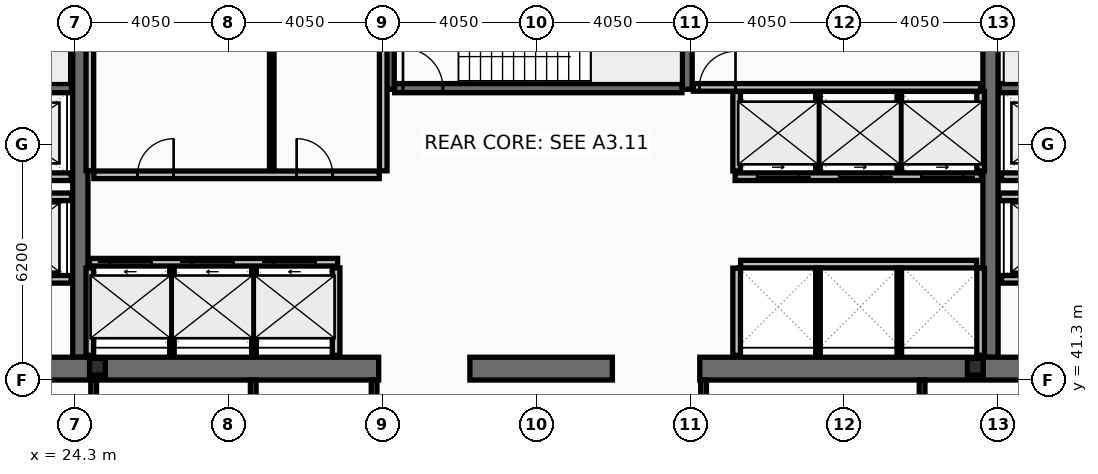
"""IFC4 building model, lengths in metres.
Left out: names, types, materials, properties, quantities, classifications, styles, units other than length and angle.
Written with IfcOpenShell. Run it as: python <this file> out.ifc"""

import sys

from ifc_helpers import new_model, si_unit, direction, frame, frame_2d, origin, origin_2d, place, context, subcontext, project, spatial, rectangle, i_section, extrude, element, fill, save


model = new_model("IFC4")
c1 = context("Model", 3, precision=1e-05, world=origin(), true_north=direction((0.0, 1.0)))
c2 = subcontext(c1, "Body", "Model", "MODEL_VIEW")
j1 = project(units=[si_unit("LENGTHUNIT", "METRE"), si_unit("PLANEANGLEUNIT", "RADIAN")], contexts=[c1])
p1 = place(None, origin())
s1 = spatial("IfcSite", under=j1, at=p1, CompositionType="ELEMENT")
p2 = place(p1, origin())
s2 = spatial("IfcBuilding", under=s1, at=p2, CompositionType="ELEMENT")
p3 = place(p2, frame((0.0, 0.0, 184.2)))
s3 = spatial("IfcBuildingStorey", under=s2, at=p3, CompositionType="ELEMENT", Elevation=184.2)
for number, where, z_axis, x_axis in (
    (1, (24.45, 41.9, 0.0), (0.0, 0.0, 1.0), (0.0, 1.0, 0.0)),
    (2, (48.4, 41.9, 0.0), (0.0, 0.0, 1.0), (0.0, 1.0, 0.0)),
):
    element("IfcWall", number, at=place(p3, frame(where, z_axis=z_axis, x_axis=x_axis)), inside=s3, PredefinedType="SHEAR", context=c2, shape_type="SweptSolid", body=[
        extrude(rectangle(XDim=11.2, YDim=0.4, at=frame_2d((5.6, 0.0))), origin(), (0.0, 0.0, 1.0), 4.24),
    ])
p4 = place(p3, frame((32.3, 41.6, 0.0), z_axis=(0.0, 0.0, 1.0), x_axis=(-1.0, 0.0, 0.0)))
e3 = element("IfcWall", 3, at=p4, inside=s3, PredefinedType="SHEAR", context=c2, shape_type="SweptSolid", body=[
    extrude(rectangle(XDim=11.45, YDim=0.6, at=frame_2d((5.725, 0.0))), origin(), (0.0, 0.0, 1.0), 4.24),
])
p5 = place(p3, frame((38.45, 41.6, 0.0), z_axis=(0.0, 0.0, 1.0), x_axis=(-1.0, 0.0, 0.0)))
e4 = element("IfcWall", 4, at=p5, inside=s3, PredefinedType="SHEAR", context=c2, shape_type="SweptSolid", body=[
    extrude(rectangle(XDim=3.75, YDim=0.6, at=frame_2d((1.875, 0.0))), origin(), (0.0, 0.0, 1.0), 4.24),
])
p6 = place(p3, frame((52.05, 41.6, 0.0), z_axis=(0.0, 0.0, 1.0), x_axis=(-1.0, 0.0, 0.0)))
e5 = element("IfcWall", 5, at=p6, inside=s3, PredefinedType="SHEAR", context=c2, shape_type="SweptSolid", body=[
    extrude(rectangle(XDim=11.3, YDim=0.6, at=frame_2d((5.65, 0.0))), origin(), (0.0, 0.0, 1.0), 4.24),
])
for number, where, z_axis, x_axis in (
    (6, (32.58, 48.95, 0.0), (0.0, 0.0, 1.0), (0.0, 1.0, 0.0)),
    (7, (40.42, 48.95, 0.0), (0.0, 0.0, 1.0), (0.0, 1.0, 0.0)),
):
    element("IfcWall", number, at=place(p3, frame(where, z_axis=z_axis, x_axis=x_axis)), inside=s3, PredefinedType="SHEAR", context=c2, shape_type="SweptSolid", body=[
        extrude(rectangle(XDim=4.15, YDim=0.26, at=frame_2d((2.075, 0.0))), origin(), (0.0, 0.0, 1.0), 4.24),
    ])
p7 = place(p3, frame((16.8, 48.98, 0.0), z_axis=(0.0, 0.0, 1.0), x_axis=(1.0, 0.0, 0.0)))
e8 = element("IfcWall", 8, at=p7, inside=s3, PredefinedType="SHEAR", context=c2, shape_type="SweptSolid", body=[
    extrude(rectangle(XDim=7.42, YDim=0.24, at=frame_2d((3.71, 0.0))), origin(), (0.0, 0.0, 1.0), 4.24),
])
p8 = place(p7, frame((0.22, 0.0, 0.0)))
e9 = element("IfcOpeningElement", 9, at=p8, cuts=e8, PredefinedType="OPENING", context=c2, shape_type="SweptSolid", body=[
    extrude(rectangle(XDim=1.05, YDim=2.15, at=frame_2d((0.525, 1.075))), frame((0.0, 0.13, 0.0), z_axis=(0.0, -1.0, 0.0), x_axis=(1.0, 0.0, 0.0)), (0.0, 0.0, 1.0), 0.26),
])
p9 = place(p3, frame((48.63, 48.98, 0.0), z_axis=(0.0, 0.0, 1.0), x_axis=(1.0, 0.0, 0.0)))
e10 = element("IfcWall", 10, at=p9, inside=s3, PredefinedType="SHEAR", context=c2, shape_type="SweptSolid", body=[
    extrude(rectangle(XDim=7.47, YDim=0.24, at=frame_2d((3.735, 0.0))), origin(), (0.0, 0.0, 1.0), 4.24),
])
p10 = place(p9, frame((6.2, 0.0, 0.0)))
e11 = element("IfcOpeningElement", 11, at=p10, cuts=e10, PredefinedType="OPENING", context=c2, shape_type="SweptSolid", body=[
    extrude(rectangle(XDim=1.05, YDim=2.15, at=frame_2d((0.525, 1.075))), frame((0.0, 0.13, 0.0), z_axis=(0.0, -1.0, 0.0), x_axis=(1.0, 0.0, 0.0)), (0.0, 0.0, 1.0), 0.26),
])
p11 = place(p3, frame((32.72, 48.98, 0.0), z_axis=(0.0, 0.0, 1.0), x_axis=(1.0, 0.0, 0.0)))
e12 = element("IfcWall", 12, at=p11, inside=s3, PredefinedType="SHEAR", context=c2, shape_type="SweptSolid", body=[
    extrude(rectangle(XDim=7.56, YDim=0.24, at=frame_2d((3.78, 0.0))), origin(), (0.0, 0.0, 1.0), 4.24),
])
p12 = place(p11, frame((0.22, 0.0, 0.0)))
e13 = element("IfcOpeningElement", 13, at=p12, cuts=e12, PredefinedType="OPENING", context=c2, shape_type="SweptSolid", body=[
    extrude(rectangle(XDim=1.05, YDim=2.15, at=frame_2d((0.525, 1.075))), frame((0.0, 0.13, 0.0), z_axis=(0.0, -1.0, 0.0), x_axis=(1.0, 0.0, 0.0)), (0.0, 0.0, 1.0), 0.26),
])
for number, where, z_axis, x_axis in (
    (14, (24.9, 41.65, 0.0), (0.0, 0.0, 1.0), (1.0, 0.0, 0.0)),
    (15, (48.0, 41.65, 0.0), (0.0, 0.0, 1.0), (1.0, 0.0, 0.0)),
):
    element("IfcColumn", number, at=place(p3, frame(where, z_axis=z_axis, x_axis=x_axis)), inside=s3, PredefinedType="COLUMN", context=c2, shape_type="SweptSolid", body=[
        extrude(i_section(OverallWidth=0.416, OverallDepth=0.446, WebThickness=0.039, FlangeThickness=0.063, at=origin_2d()), origin(), (0.0, 0.0, 1.0), 4.4),
    ])
p13 = place(p3, frame((24.69, 44.4, 0.0), z_axis=(0.0, 0.0, 1.0), x_axis=(1.0, 0.0, 0.0)))
e16 = element("IfcWall", 16, at=p13, inside=s3, PredefinedType="PARTITIONING", context=c2, shape_type="SweptSolid", body=[
    extrude(rectangle(XDim=6.53, YDim=0.2, at=frame_2d((3.265, 0.0))), origin(), (0.0, 0.0, 1.0), 4.24),
])
p14 = place(p13, frame((0.53, 0.0, 0.0)))
e17 = element("IfcOpeningElement", 17, at=p14, cuts=e16, PredefinedType="OPENING", context=c2, shape_type="SweptSolid", body=[
    extrude(rectangle(XDim=1.1, YDim=2.18, at=frame_2d((0.55, 1.09))), frame((0.0, 0.11, 0.0), z_axis=(0.0, -1.0, 0.0), x_axis=(1.0, 0.0, 0.0)), (0.0, 0.0, 1.0), 0.22),
])
p15 = place(p13, frame((2.69, 0.0, 0.0)))
e18 = element("IfcOpeningElement", 18, at=p15, cuts=e16, PredefinedType="OPENING", context=c2, shape_type="SweptSolid", body=[
    extrude(rectangle(XDim=1.1, YDim=2.18, at=frame_2d((0.55, 1.09))), frame((0.0, 0.11, 0.0), z_axis=(0.0, -1.0, 0.0), x_axis=(1.0, 0.0, 0.0)), (0.0, 0.0, 1.0), 0.22),
])
p16 = place(p13, frame((4.85, 0.0, 0.0)))
e19 = element("IfcOpeningElement", 19, at=p16, cuts=e16, PredefinedType="OPENING", context=c2, shape_type="SweptSolid", body=[
    extrude(rectangle(XDim=1.1, YDim=2.18, at=frame_2d((0.55, 1.09))), frame((0.0, 0.11, 0.0), z_axis=(0.0, -1.0, 0.0), x_axis=(1.0, 0.0, 0.0)), (0.0, 0.0, 1.0), 0.22),
])
p17 = place(p3, frame((51.61, 43.95, 0.0), z_axis=(0.0, 0.0, 1.0), x_axis=(-1.0, 0.0, 0.0)))
e20 = element("IfcWall", 20, at=p17, inside=s3, PredefinedType="PARTITIONING", context=c2, shape_type="SweptSolid", body=[
    extrude(rectangle(XDim=2.92, YDim=0.2, at=frame_2d((1.46, 0.0))), origin(), (0.0, 0.0, 1.0), 4.24),
])
p18 = place(p17, frame((0.81, 0.0, 0.0)))
e21 = element("IfcOpeningElement", 21, at=p18, cuts=e20, PredefinedType="OPENING", context=c2, shape_type="SweptSolid", body=[
    extrude(rectangle(XDim=1.3, YDim=2.18, at=frame_2d((0.65, 1.09))), frame((0.0, 0.11, 0.0), z_axis=(0.0, -1.0, 0.0), x_axis=(1.0, 0.0, 0.0)), (0.0, 0.0, 1.0), 0.22),
])
p19 = place(p3, frame((24.21, 43.95, 0.0), z_axis=(0.0, 0.0, 1.0), x_axis=(-1.0, 0.0, 0.0)))
e22 = element("IfcWall", 22, at=p19, inside=s3, PredefinedType="PARTITIONING", context=c2, shape_type="SweptSolid", body=[
    extrude(rectangle(XDim=2.97, YDim=0.2, at=frame_2d((1.485, 0.0))), origin(), (0.0, 0.0, 1.0), 4.24),
])
p20 = place(p19, frame((0.86, 0.0, 0.0)))
e23 = element("IfcOpeningElement", 23, at=p20, cuts=e22, PredefinedType="OPENING", context=c2, shape_type="SweptSolid", body=[
    extrude(rectangle(XDim=1.3, YDim=2.18, at=frame_2d((0.65, 1.09))), frame((0.0, 0.11, 0.0), z_axis=(0.0, -1.0, 0.0), x_axis=(1.0, 0.0, 0.0)), (0.0, 0.0, 1.0), 0.22),
])
p21 = place(p3, frame((51.61, 46.65, 0.0), z_axis=(0.0, 0.0, 1.0), x_axis=(-1.0, 0.0, 0.0)))
e24 = element("IfcWall", 24, at=p21, inside=s3, PredefinedType="PARTITIONING", context=c2, shape_type="SweptSolid", body=[
    extrude(rectangle(XDim=2.92, YDim=0.2, at=frame_2d((1.46, 0.0))), origin(), (0.0, 0.0, 1.0), 4.24),
])
p22 = place(p21, frame((0.86, 0.0, 0.0)))
e25 = element("IfcOpeningElement", 25, at=p22, cuts=e24, PredefinedType="OPENING", context=c2, shape_type="SweptSolid", body=[
    extrude(rectangle(XDim=1.2, YDim=2.18, at=frame_2d((0.6, 1.09))), frame((0.0, 0.11, 0.0), z_axis=(0.0, -1.0, 0.0), x_axis=(1.0, 0.0, 0.0)), (0.0, 0.0, 1.0), 0.22),
])
p23 = place(p3, frame((24.21, 46.65, 0.0), z_axis=(0.0, 0.0, 1.0), x_axis=(-1.0, 0.0, 0.0)))
e26 = element("IfcWall", 26, at=p23, inside=s3, PredefinedType="PARTITIONING", context=c2, shape_type="SweptSolid", body=[
    extrude(rectangle(XDim=2.97, YDim=0.2, at=frame_2d((1.485, 0.0))), origin(), (0.0, 0.0, 1.0), 4.24),
])
p24 = place(p23, frame((0.91, 0.0, 0.0)))
e27 = element("IfcOpeningElement", 27, at=p24, cuts=e26, PredefinedType="OPENING", context=c2, shape_type="SweptSolid", body=[
    extrude(rectangle(XDim=1.2, YDim=2.18, at=frame_2d((0.6, 1.09))), frame((0.0, 0.11, 0.0), z_axis=(0.0, -1.0, 0.0), x_axis=(1.0, 0.0, 0.0)), (0.0, 0.0, 1.0), 0.22),
])
p25 = place(p3, frame((48.16, 46.65, 0.0), z_axis=(0.0, 0.0, 1.0), x_axis=(-1.0, 0.0, 0.0)))
e28 = element("IfcWall", 28, at=p25, inside=s3, PredefinedType="PARTITIONING", context=c2, shape_type="SweptSolid", body=[
    extrude(rectangle(XDim=6.48, YDim=0.2, at=frame_2d((3.24, 0.0))), origin(), (0.0, 0.0, 1.0), 4.24),
])
p26 = place(p25, frame((4.8, 0.0, 0.0)))
e29 = element("IfcOpeningElement", 29, at=p26, cuts=e28, PredefinedType="OPENING", context=c2, shape_type="SweptSolid", body=[
    extrude(rectangle(XDim=1.1, YDim=2.18, at=frame_2d((0.55, 1.09))), frame((0.0, 0.11, 0.0), z_axis=(0.0, -1.0, 0.0), x_axis=(1.0, 0.0, 0.0)), (0.0, 0.0, 1.0), 0.22),
])
p27 = place(p25, frame((2.64, 0.0, 0.0)))
e30 = element("IfcOpeningElement", 30, at=p27, cuts=e28, PredefinedType="OPENING", context=c2, shape_type="SweptSolid", body=[
    extrude(rectangle(XDim=1.1, YDim=2.18, at=frame_2d((0.55, 1.09))), frame((0.0, 0.11, 0.0), z_axis=(0.0, -1.0, 0.0), x_axis=(1.0, 0.0, 0.0)), (0.0, 0.0, 1.0), 0.22),
])
p28 = place(p25, frame((0.48, 0.0, 0.0)))
e31 = element("IfcOpeningElement", 31, at=p28, cuts=e28, PredefinedType="OPENING", context=c2, shape_type="SweptSolid", body=[
    extrude(rectangle(XDim=1.1, YDim=2.18, at=frame_2d((0.55, 1.09))), frame((0.0, 0.11, 0.0), z_axis=(0.0, -1.0, 0.0), x_axis=(1.0, 0.0, 0.0)), (0.0, 0.0, 1.0), 0.22),
])
p29 = place(p3, frame((21.2, 46.12, 0.0), z_axis=(0.0, 0.0, 1.0), x_axis=(1.0, 0.0, 0.0)))
e32 = element("IfcWall", 32, at=p29, inside=s3, PredefinedType="PARTITIONING", context=c2, shape_type="SweptSolid", body=[
    extrude(rectangle(XDim=3.02, YDim=0.2, at=frame_2d((1.51, 0.0))), origin(), (0.0, 0.0, 1.0), 4.24),
])
p30 = place(p3, frame((48.63, 46.12, 0.0), z_axis=(0.0, 0.0, 1.0), x_axis=(1.0, 0.0, 0.0)))
e33 = element("IfcWall", 33, at=p30, inside=s3, PredefinedType="PARTITIONING", context=c2, shape_type="SweptSolid", body=[
    extrude(rectangle(XDim=3.07, YDim=0.2, at=frame_2d((1.535, 0.0))), origin(), (0.0, 0.0, 1.0), 4.24),
])
for number, where, z_axis, x_axis in (
    (34, (24.7, 46.805, 0.0), (0.0, 0.0, 1.0), (0.0, 1.0, 0.0)),
    (35, (32.42, 46.805, 0.0), (0.0, 0.0, 1.0), (0.0, 1.0, 0.0)),
):
    element("IfcWall", number, at=place(p3, frame(where, z_axis=z_axis, x_axis=x_axis)), inside=s3, PredefinedType="PARTITIONING", context=c2, shape_type="SweptSolid", body=[
        extrude(rectangle(XDim=5.99, YDim=0.2, at=frame_2d((2.995, 0.0))), origin(), (0.0, 0.0, 1.0), 4.24),
    ])
p31 = place(p3, frame((29.486, 46.805, 0.0), z_axis=(0.0, 0.0, 1.0), x_axis=(0.0, 1.0, 0.0)))
e36 = element("IfcWall", 36, at=p31, inside=s3, PredefinedType="PARTITIONING", context=c2, shape_type="SweptSolid", body=[
    extrude(rectangle(XDim=5.99, YDim=0.12, at=frame_2d((2.995, 0.0))), origin(), (0.0, 0.0, 1.0), 4.24),
])
p32 = place(p3, frame((24.805, 46.7, 0.0), z_axis=(0.0, 0.0, 1.0), x_axis=(1.0, 0.0, 0.0)))
e37 = element("IfcWall", 37, at=p32, inside=s3, PredefinedType="PARTITIONING", context=c2, shape_type="SweptSolid", body=[
    extrude(rectangle(XDim=7.51, YDim=0.2, at=frame_2d((3.755, 0.0))), origin(), (0.0, 0.0, 1.0), 4.24),
])
p33 = place(p32, frame((1.15, 0.0, 0.0)))
e38 = element("IfcOpeningElement", 38, at=p33, cuts=e37, PredefinedType="OPENING", context=c2, shape_type="SweptSolid", body=[
    extrude(rectangle(XDim=0.95, YDim=2.1, at=frame_2d((0.475, 1.05))), frame((0.0, 0.11, 0.0), z_axis=(0.0, -1.0, 0.0), x_axis=(1.0, 0.0, 0.0)), (0.0, 0.0, 1.0), 0.22),
])
p34 = place(p32, frame((5.336, 0.0, 0.0)))
e39 = element("IfcOpeningElement", 39, at=p34, cuts=e37, PredefinedType="OPENING", context=c2, shape_type="SweptSolid", body=[
    extrude(rectangle(XDim=0.95, YDim=2.1, at=frame_2d((0.475, 1.05))), frame((0.0, 0.11, 0.0), z_axis=(0.0, -1.0, 0.0), x_axis=(1.0, 0.0, 0.0)), (0.0, 0.0, 1.0), 0.22),
])
for number, where, z_axis, x_axis in (
    (40, (24.7, 41.95, 0.0), (0.0, 0.0, 1.0), (0.0, 1.0, 0.0)),
    (41, (31.18, 41.95, 0.0), (0.0, 0.0, 1.0), (0.0, 1.0, 0.0)),
):
    element("IfcWall", number, at=place(p3, frame(where, z_axis=z_axis, x_axis=x_axis)), inside=s3, PredefinedType="PARTITIONING", context=c2, shape_type="SweptSolid", body=[
        extrude(rectangle(XDim=2.3, YDim=0.2, at=frame_2d((1.15, 0.0))), origin(), (0.0, 0.0, 1.0), 4.24),
    ])
for number, where, z_axis, x_axis in (
    (42, (26.86, 41.95, 0.0), (0.0, 0.0, 1.0), (0.0, 1.0, 0.0)),
    (43, (29.02, 41.95, 0.0), (0.0, 0.0, 1.0), (0.0, 1.0, 0.0)),
):
    element("IfcWall", number, at=place(p3, frame(where, z_axis=z_axis, x_axis=x_axis)), inside=s3, PredefinedType="PARTITIONING", context=c2, shape_type="SweptSolid", body=[
        extrude(rectangle(XDim=2.3, YDim=0.12, at=frame_2d((1.15, 0.0))), origin(), (0.0, 0.0, 1.0), 4.24),
    ])
for number, where, z_axis, x_axis in (
    (44, (41.72, 46.8, 0.0), (0.0, 0.0, 1.0), (0.0, 1.0, 0.0)),
    (45, (48.14, 46.8, 0.0), (0.0, 0.0, 1.0), (0.0, 1.0, 0.0)),
):
    element("IfcWall", number, at=place(p3, frame(where, z_axis=z_axis, x_axis=x_axis)), inside=s3, PredefinedType="PARTITIONING", context=c2, shape_type="SweptSolid", body=[
        extrude(rectangle(XDim=2.095, YDim=0.2, at=frame_2d((1.047, 0.0))), origin(), (0.0, 0.0, 1.0), 4.24),
    ])
for number, where, z_axis, x_axis in (
    (46, (43.86, 46.8, 0.0), (0.0, 0.0, 1.0), (0.0, 1.0, 0.0)),
    (47, (46.0, 46.8, 0.0), (0.0, 0.0, 1.0), (0.0, 1.0, 0.0)),
):
    element("IfcWall", number, at=place(p3, frame(where, z_axis=z_axis, x_axis=x_axis)), inside=s3, PredefinedType="PARTITIONING", context=c2, shape_type="SweptSolid", body=[
        extrude(rectangle(XDim=2.095, YDim=0.12, at=frame_2d((1.047, 0.0))), origin(), (0.0, 0.0, 1.0), 4.24),
    ])
p35 = place(p3, frame((41.825, 44.35, 0.0), z_axis=(0.0, 0.0, 1.0), x_axis=(1.0, 0.0, 0.0)))
e48 = element("IfcWall", 48, at=p35, inside=s3, PredefinedType="PARTITIONING", context=c2, shape_type="SweptSolid", body=[
    extrude(rectangle(XDim=6.21, YDim=0.2, at=frame_2d((3.105, 0.0))), origin(), (0.0, 0.0, 1.0), 4.24),
])
for number, where, z_axis, x_axis in (
    (49, (41.72, 41.95, 0.0), (0.0, 0.0, 1.0), (0.0, 1.0, 0.0)),
    (50, (48.14, 41.95, 0.0), (0.0, 0.0, 1.0), (0.0, 1.0, 0.0)),
):
    element("IfcWall", number, at=place(p3, frame(where, z_axis=z_axis, x_axis=x_axis)), inside=s3, PredefinedType="PARTITIONING", context=c2, shape_type="SweptSolid", body=[
        extrude(rectangle(XDim=2.295, YDim=0.2, at=frame_2d((1.147, 0.0))), origin(), (0.0, 0.0, 1.0), 4.24),
    ])
for number, where, z_axis, x_axis in (
    (51, (43.86, 41.95, 0.0), (0.0, 0.0, 1.0), (0.0, 1.0, 0.0)),
    (52, (46.0, 41.95, 0.0), (0.0, 0.0, 1.0), (0.0, 1.0, 0.0)),
):
    element("IfcWall", number, at=place(p3, frame(where, z_axis=z_axis, x_axis=x_axis)), inside=s3, PredefinedType="PARTITIONING", context=c2, shape_type="SweptSolid", body=[
        extrude(rectangle(XDim=2.295, YDim=0.12, at=frame_2d((1.147, 0.0))), origin(), (0.0, 0.0, 1.0), 4.24),
    ])
p36 = place(p3, frame((40.58, 49.0, 0.0), z_axis=(0.0, 0.0, 1.0), x_axis=(1.0, 0.0, 0.0)))
e53 = element("IfcWall", 53, at=p36, inside=s3, PredefinedType="PARTITIONING", context=c2, shape_type="SweptSolid", body=[
    extrude(rectangle(XDim=7.56, YDim=0.2, at=frame_2d((3.78, 0.0))), origin(), (0.0, 0.0, 1.0), 4.24),
])
p37 = place(p36, frame((0.16, 0.0, 0.0)))
e54 = element("IfcOpeningElement", 54, at=p37, cuts=e53, PredefinedType="OPENING", context=c2, shape_type="SweptSolid", body=[
    extrude(rectangle(XDim=0.95, YDim=2.1, at=frame_2d((0.475, 1.05))), frame((0.0, 0.11, 0.0), z_axis=(0.0, -1.0, 0.0), x_axis=(1.0, 0.0, 0.0)), (0.0, 0.0, 1.0), 0.22),
])
p38 = place(p3, frame((24.8, 38.28, 0.0), z_axis=(0.0, 0.0, 1.0), x_axis=(0.0, 1.0, 0.0)))
e55 = element("IfcWall", 55, at=p38, inside=s3, PredefinedType="PARTITIONING", context=c2, shape_type="SweptSolid", body=[
    extrude(rectangle(XDim=3.02, YDim=0.15, at=frame_2d((1.51, 0.0))), origin(), (0.0, 0.0, 1.0), 3.53),
])
for number, where, z_axis, x_axis in (
    (56, (29.0, 38.28, 0.0), (0.0, 0.0, 1.0), (0.0, 1.0, 0.0)),
    (57, (32.18, 38.28, 0.0), (0.0, 0.0, 1.0), (0.0, 1.0, 0.0)),
):
    element("IfcWall", number, at=place(p3, frame(where, z_axis=z_axis, x_axis=x_axis)), inside=s3, PredefinedType="PARTITIONING", context=c2, shape_type="SweptSolid", body=[
        extrude(rectangle(XDim=3.02, YDim=0.15, at=frame_2d((1.51, 0.0))), origin(), (0.0, 0.0, 1.0), 4.24),
    ])
for number, where, z_axis, x_axis in (
    (58, (40.85, 38.2, 0.0), (0.0, 0.0, 1.0), (0.0, 1.0, 0.0)),
    (59, (46.6, 38.2, 0.0), (0.0, 0.0, 1.0), (0.0, 1.0, 0.0)),
):
    element("IfcWall", number, at=place(p3, frame(where, z_axis=z_axis, x_axis=x_axis)), inside=s3, PredefinedType="PARTITIONING", context=c2, shape_type="SweptSolid", body=[
        extrude(rectangle(XDim=3.1, YDim=0.15, at=frame_2d((1.55, 0.0))), origin(), (0.0, 0.0, 1.0), 4.24),
    ])
p39 = place(p12, origin())
e60 = element("IfcDoor", 60, at=p39, inside=s3, OperationType="SINGLE_SWING_LEFT", PredefinedType="DOOR", context=c2, shape_type="SweptSolid", body=[
    extrude(rectangle(XDim=1.05, YDim=2.15, at=frame_2d((0.525, 1.075))), frame((0.0, 0.025, 0.0), z_axis=(0.0, -1.0, 0.0), x_axis=(1.0, 0.0, 0.0)), (0.0, 0.0, 1.0), 0.05),
])
fill(e13, e60)
p40 = place(p14, origin())
e61 = element("IfcDoor", 61, at=p40, inside=s3, OperationType="SLIDING_TO_LEFT", PredefinedType="DOOR", context=c2, shape_type="SweptSolid", body=[
    extrude(rectangle(XDim=1.1, YDim=2.18, at=frame_2d((0.55, 1.09))), frame((0.0, 0.025, 0.0), z_axis=(0.0, -1.0, 0.0), x_axis=(1.0, 0.0, 0.0)), (0.0, 0.0, 1.0), 0.05),
])
fill(e17, e61)
p41 = place(p15, origin())
e62 = element("IfcDoor", 62, at=p41, inside=s3, OperationType="SLIDING_TO_LEFT", PredefinedType="DOOR", context=c2, shape_type="SweptSolid", body=[
    extrude(rectangle(XDim=1.1, YDim=2.18, at=frame_2d((0.55, 1.09))), frame((0.0, 0.025, 0.0), z_axis=(0.0, -1.0, 0.0), x_axis=(1.0, 0.0, 0.0)), (0.0, 0.0, 1.0), 0.05),
])
fill(e18, e62)
p42 = place(p16, origin())
e63 = element("IfcDoor", 63, at=p42, inside=s3, OperationType="SLIDING_TO_LEFT", PredefinedType="DOOR", context=c2, shape_type="SweptSolid", body=[
    extrude(rectangle(XDim=1.1, YDim=2.18, at=frame_2d((0.55, 1.09))), frame((0.0, 0.025, 0.0), z_axis=(0.0, -1.0, 0.0), x_axis=(1.0, 0.0, 0.0)), (0.0, 0.0, 1.0), 0.05),
])
fill(e19, e63)
p43 = place(p26, origin())
e64 = element("IfcDoor", 64, at=p43, inside=s3, OperationType="SLIDING_TO_LEFT", PredefinedType="DOOR", context=c2, shape_type="SweptSolid", body=[
    extrude(rectangle(XDim=1.1, YDim=2.18, at=frame_2d((0.55, 1.09))), frame((0.0, 0.025, 0.0), z_axis=(0.0, -1.0, 0.0), x_axis=(1.0, 0.0, 0.0)), (0.0, 0.0, 1.0), 0.05),
])
fill(e29, e64)
p44 = place(p27, origin())
e65 = element("IfcDoor", 65, at=p44, inside=s3, OperationType="SLIDING_TO_LEFT", PredefinedType="DOOR", context=c2, shape_type="SweptSolid", body=[
    extrude(rectangle(XDim=1.1, YDim=2.18, at=frame_2d((0.55, 1.09))), frame((0.0, 0.025, 0.0), z_axis=(0.0, -1.0, 0.0), x_axis=(1.0, 0.0, 0.0)), (0.0, 0.0, 1.0), 0.05),
])
fill(e30, e65)
p45 = place(p28, origin())
e66 = element("IfcDoor", 66, at=p45, inside=s3, OperationType="SLIDING_TO_LEFT", PredefinedType="DOOR", context=c2, shape_type="SweptSolid", body=[
    extrude(rectangle(XDim=1.1, YDim=2.18, at=frame_2d((0.55, 1.09))), frame((0.0, 0.025, 0.0), z_axis=(0.0, -1.0, 0.0), x_axis=(1.0, 0.0, 0.0)), (0.0, 0.0, 1.0), 0.05),
])
fill(e31, e66)
p46 = place(p33, origin())
e67 = element("IfcDoor", 67, at=p46, inside=s3, OperationType="SINGLE_SWING_RIGHT", PredefinedType="DOOR", context=c2, shape_type="SweptSolid", body=[
    extrude(rectangle(XDim=0.95, YDim=2.1, at=frame_2d((0.475, 1.05))), frame((0.0, 0.025, 0.0), z_axis=(0.0, -1.0, 0.0), x_axis=(1.0, 0.0, 0.0)), (0.0, 0.0, 1.0), 0.05),
])
fill(e38, e67)
p47 = place(p34, origin())
e68 = element("IfcDoor", 68, at=p47, inside=s3, OperationType="SINGLE_SWING_LEFT", PredefinedType="DOOR", context=c2, shape_type="SweptSolid", body=[
    extrude(rectangle(XDim=0.95, YDim=2.1, at=frame_2d((0.475, 1.05))), frame((0.0, 0.025, 0.0), z_axis=(0.0, -1.0, 0.0), x_axis=(1.0, 0.0, 0.0)), (0.0, 0.0, 1.0), 0.05),
])
fill(e39, e68)
p48 = place(p37, origin())
e69 = element("IfcDoor", 69, at=p48, inside=s3, OperationType="SINGLE_SWING_RIGHT", PredefinedType="DOOR", context=c2, shape_type="SweptSolid", body=[
    extrude(rectangle(XDim=0.95, YDim=2.1, at=frame_2d((0.475, 1.05))), frame((0.0, 0.025, 0.0), z_axis=(0.0, -1.0, 0.0), x_axis=(1.0, 0.0, 0.0)), (0.0, 0.0, 1.0), 0.05),
])
fill(e54, e69)
save(model, sys.argv[1])
